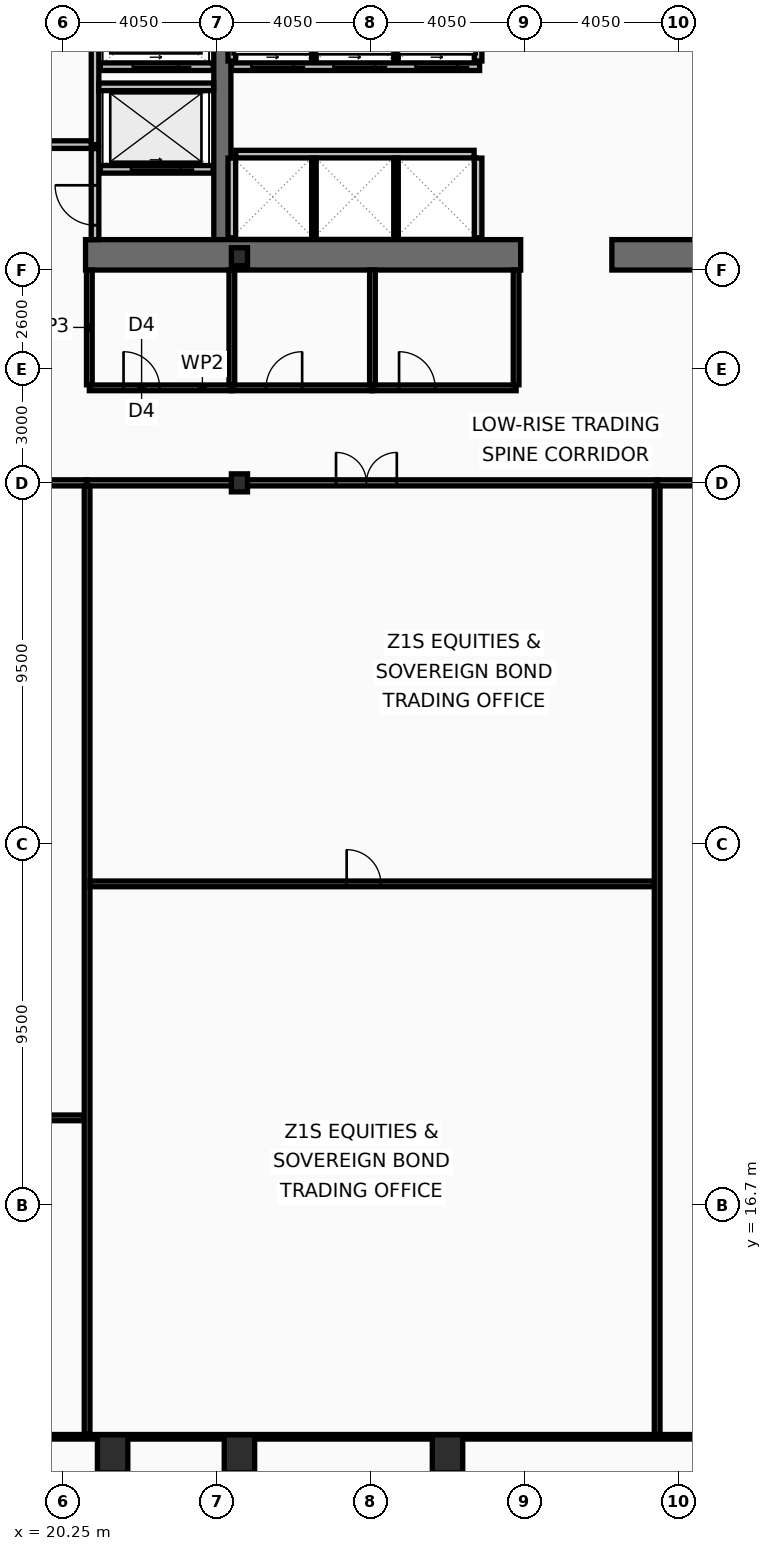
"""IFC4 building model, lengths in metres.
Left out: names, types, materials, properties, quantities, classifications, styles, units other than length and angle.
Written with IfcOpenShell. Run it as: python <this file> out.ifc"""

import sys

from ifc_helpers import new_model, si_unit, direction, frame, frame_2d, origin, origin_2d, place, context, subcontext, project, spatial, rectangle, hollow_rectangle, i_section, extrude, element, fill, save


model = new_model("IFC4")
c1 = context("Model", 3, precision=1e-05, world=origin(), true_north=direction((0.0, 1.0)))
c2 = subcontext(c1, "Body", "Model", "MODEL_VIEW")
j1 = project(units=[si_unit("LENGTHUNIT", "METRE"), si_unit("PLANEANGLEUNIT", "RADIAN")], contexts=[c1])
p1 = place(None, origin())
s1 = spatial("IfcSite", under=j1, at=p1, CompositionType="ELEMENT")
p2 = place(p1, origin())
s2 = spatial("IfcBuilding", under=s1, at=p2, CompositionType="ELEMENT")
p3 = place(p2, frame((0.0, 0.0, 37.8)))
s3 = spatial("IfcBuildingStorey", under=s2, at=p3, CompositionType="ELEMENT", Elevation=37.8)
p4 = place(p3, frame((24.45, 42.1, 0.0), z_axis=(0.0, 0.0, 1.0), x_axis=(0.0, 1.0, 0.0)))
e1 = element("IfcWall", 1, at=p4, inside=s3, PredefinedType="SHEAR", context=c2, shape_type="SweptSolid", body=[
    extrude(rectangle(XDim=10.8, YDim=0.45, at=frame_2d((5.4, 0.0))), origin(), (0.0, 0.0, 1.0), 3.82),
])
p5 = place(p3, frame((32.3, 41.7, 0.0), z_axis=(0.0, 0.0, 1.0), x_axis=(-1.0, 0.0, 0.0)))
e2 = element("IfcWall", 2, at=p5, inside=s3, PredefinedType="SHEAR", context=c2, shape_type="SweptSolid", body=[
    extrude(rectangle(XDim=11.45, YDim=0.8, at=frame_2d((5.725, 0.0))), origin(), (0.0, 0.0, 1.0), 3.82),
])
p6 = place(p3, frame((38.45, 41.7, 0.0), z_axis=(0.0, 0.0, 1.0), x_axis=(-1.0, 0.0, 0.0)))
e3 = element("IfcWall", 3, at=p6, inside=s3, PredefinedType="SHEAR", context=c2, shape_type="SweptSolid", body=[
    extrude(rectangle(XDim=3.75, YDim=0.8, at=frame_2d((1.875, 0.0))), origin(), (0.0, 0.0, 1.0), 3.82),
])
for number, where, z_axis, x_axis in (
    (4, (21.562, 10.15, 0.0), (0.0, 0.0, 1.0), (1.0, 0.0, 0.0)),
    (5, (24.9, 10.15, 0.0), (0.0, 0.0, 1.0), (1.0, 0.0, 0.0)),
    (6, (30.375, 10.15, 0.0), (0.0, 0.0, 1.0), (1.0, 0.0, 0.0)),
):
    element("IfcColumn", number, at=place(p3, frame(where, z_axis=z_axis, x_axis=x_axis)), inside=s3, PredefinedType="COLUMN", context=c2, shape_type="SweptSolid", body=[
        extrude(hollow_rectangle(XDim=0.8, YDim=1.0, WallThickness=0.055, at=origin_2d()), origin(), (0.0, 0.0, 1.0), 4.0),
    ])
for number, where, z_axis, x_axis in (
    (7, (24.9, 35.7, 0.0), (0.0, 0.0, 1.0), (1.0, 0.0, 0.0)),
    (8, (24.9, 41.65, 0.0), (0.0, 0.0, 1.0), (1.0, 0.0, 0.0)),
):
    element("IfcColumn", number, at=place(p3, frame(where, z_axis=z_axis, x_axis=x_axis)), inside=s3, PredefinedType="COLUMN", context=c2, shape_type="SweptSolid", body=[
        extrude(i_section(OverallWidth=0.424, OverallDepth=0.474, WebThickness=0.048, FlangeThickness=0.077, at=origin_2d()), origin(), (0.0, 0.0, 1.0), 4.0),
    ])
p7 = place(p3, frame((24.21, 43.95, 0.0), z_axis=(0.0, 0.0, 1.0), x_axis=(-1.0, 0.0, 0.0)))
e9 = element("IfcWall", 9, at=p7, inside=s3, PredefinedType="PARTITIONING", context=c2, shape_type="SweptSolid", body=[
    extrude(rectangle(XDim=2.97, YDim=0.2, at=frame_2d((1.485, 0.0))), origin(), (0.0, 0.0, 1.0), 3.82),
])
p8 = place(p7, frame((0.86, 0.0, 0.0)))
e10 = element("IfcOpeningElement", 10, at=p8, cuts=e9, PredefinedType="OPENING", context=c2, shape_type="SweptSolid", body=[
    extrude(rectangle(XDim=1.3, YDim=2.18, at=frame_2d((0.65, 1.09))), frame((0.0, 0.11, 0.0), z_axis=(0.0, -1.0, 0.0), x_axis=(1.0, 0.0, 0.0)), (0.0, 0.0, 1.0), 0.22),
])
p9 = place(p3, frame((24.21, 46.65, 0.0), z_axis=(0.0, 0.0, 1.0), x_axis=(-1.0, 0.0, 0.0)))
e11 = element("IfcWall", 11, at=p9, inside=s3, PredefinedType="PARTITIONING", context=c2, shape_type="SweptSolid", body=[
    extrude(rectangle(XDim=2.97, YDim=0.2, at=frame_2d((1.485, 0.0))), origin(), (0.0, 0.0, 1.0), 3.82),
])
p10 = place(p9, frame((0.91, 0.0, 0.0)))
e12 = element("IfcOpeningElement", 12, at=p10, cuts=e11, PredefinedType="OPENING", context=c2, shape_type="SweptSolid", body=[
    extrude(rectangle(XDim=1.2, YDim=2.18, at=frame_2d((0.6, 1.09))), frame((0.0, 0.11, 0.0), z_axis=(0.0, -1.0, 0.0), x_axis=(1.0, 0.0, 0.0)), (0.0, 0.0, 1.0), 0.22),
])
p11 = place(p3, frame((31.22, 46.65, 0.0), z_axis=(0.0, 0.0, 1.0), x_axis=(-1.0, 0.0, 0.0)))
e13 = element("IfcWall", 13, at=p11, inside=s3, PredefinedType="PARTITIONING", context=c2, shape_type="SweptSolid", body=[
    extrude(rectangle(XDim=6.53, YDim=0.2, at=frame_2d((3.265, 0.0))), origin(), (0.0, 0.0, 1.0), 3.82),
])
p12 = place(p11, frame((4.9, 0.0, 0.0)))
e14 = element("IfcOpeningElement", 14, at=p12, cuts=e13, PredefinedType="OPENING", context=c2, shape_type="SweptSolid", body=[
    extrude(rectangle(XDim=1.1, YDim=2.18, at=frame_2d((0.55, 1.09))), frame((0.0, 0.11, 0.0), z_axis=(0.0, -1.0, 0.0), x_axis=(1.0, 0.0, 0.0)), (0.0, 0.0, 1.0), 0.22),
])
p13 = place(p11, frame((2.74, 0.0, 0.0)))
e15 = element("IfcOpeningElement", 15, at=p13, cuts=e13, PredefinedType="OPENING", context=c2, shape_type="SweptSolid", body=[
    extrude(rectangle(XDim=1.1, YDim=2.18, at=frame_2d((0.55, 1.09))), frame((0.0, 0.11, 0.0), z_axis=(0.0, -1.0, 0.0), x_axis=(1.0, 0.0, 0.0)), (0.0, 0.0, 1.0), 0.22),
])
p14 = place(p11, frame((0.58, 0.0, 0.0)))
e16 = element("IfcOpeningElement", 16, at=p14, cuts=e13, PredefinedType="OPENING", context=c2, shape_type="SweptSolid", body=[
    extrude(rectangle(XDim=1.1, YDim=2.18, at=frame_2d((0.55, 1.09))), frame((0.0, 0.11, 0.0), z_axis=(0.0, -1.0, 0.0), x_axis=(1.0, 0.0, 0.0)), (0.0, 0.0, 1.0), 0.22),
])
p15 = place(p3, frame((21.1, 44.6, 0.0), z_axis=(0.0, 0.0, 1.0), x_axis=(0.0, 1.0, 0.0)))
e17 = element("IfcWall", 17, at=p15, inside=s3, PredefinedType="PARTITIONING", context=c2, shape_type="SweptSolid", body=[
    extrude(rectangle(XDim=4.3, YDim=0.2, at=frame_2d((2.15, 0.0))), origin(), (0.0, 0.0, 1.0), 3.82),
])
p16 = place(p3, frame((17.0, 44.6, 0.0), z_axis=(0.0, 0.0, 1.0), x_axis=(1.0, 0.0, 0.0)))
e18 = element("IfcWall", 18, at=p16, inside=s3, PredefinedType="PARTITIONING", context=c2, shape_type="SweptSolid", body=[
    extrude(rectangle(XDim=4.0, YDim=0.2, at=frame_2d((2.0, 0.0))), origin(), (0.0, 0.0, 1.0), 3.82),
])
p17 = place(p16, frame((1.25, 0.0, 0.0)))
e19 = element("IfcOpeningElement", 19, at=p17, cuts=e18, PredefinedType="OPENING", context=c2, shape_type="SweptSolid", body=[
    extrude(rectangle(XDim=1.05, YDim=2.15, at=frame_2d((0.525, 1.075))), frame((0.0, 0.11, 0.0), z_axis=(0.0, -1.0, 0.0), x_axis=(1.0, 0.0, 0.0)), (0.0, 0.0, 1.0), 0.22),
])
p18 = place(p3, frame((21.2, 46.12, 0.0), z_axis=(0.0, 0.0, 1.0), x_axis=(1.0, 0.0, 0.0)))
e20 = element("IfcWall", 20, at=p18, inside=s3, PredefinedType="PARTITIONING", context=c2, shape_type="SweptSolid", body=[
    extrude(rectangle(XDim=3.02, YDim=0.2, at=frame_2d((1.51, 0.0))), origin(), (0.0, 0.0, 1.0), 3.82),
])
p19 = place(p3, frame((21.1, 42.1, 0.0), z_axis=(0.0, 0.0, 1.0), x_axis=(0.0, 1.0, 0.0)))
e21 = element("IfcWall", 21, at=p19, inside=s3, PredefinedType="PARTITIONING", context=c2, shape_type="SweptSolid", body=[
    extrude(rectangle(XDim=2.395, YDim=0.2, at=frame_2d((1.198, 0.0))), origin(), (0.0, 0.0, 1.0), 3.82),
])
p20 = place(p19, frame((0.38, 0.0, 0.0)))
e22 = element("IfcOpeningElement", 22, at=p20, cuts=e21, PredefinedType="OPENING", context=c2, shape_type="SweptSolid", body=[
    extrude(rectangle(XDim=1.05, YDim=2.15, at=frame_2d((0.525, 1.075))), frame((0.0, 0.11, 0.0), z_axis=(0.0, -1.0, 0.0), x_axis=(1.0, 0.0, 0.0)), (0.0, 0.0, 1.0), 0.22),
])
for number, where, z_axis, x_axis in (
    (23, (24.7, 46.8, 0.0), (0.0, 0.0, 1.0), (0.0, 1.0, 0.0)),
    (24, (31.18, 46.8, 0.0), (0.0, 0.0, 1.0), (0.0, 1.0, 0.0)),
):
    element("IfcWall", number, at=place(p3, frame(where, z_axis=z_axis, x_axis=x_axis)), inside=s3, PredefinedType="PARTITIONING", context=c2, shape_type="SweptSolid", body=[
        extrude(rectangle(XDim=2.095, YDim=0.2, at=frame_2d((1.047, 0.0))), origin(), (0.0, 0.0, 1.0), 3.82),
    ])
for number, where, z_axis, x_axis in (
    (25, (26.86, 46.8, 0.0), (0.0, 0.0, 1.0), (0.0, 1.0, 0.0)),
    (26, (29.02, 46.8, 0.0), (0.0, 0.0, 1.0), (0.0, 1.0, 0.0)),
):
    element("IfcWall", number, at=place(p3, frame(where, z_axis=z_axis, x_axis=x_axis)), inside=s3, PredefinedType="PARTITIONING", context=c2, shape_type="SweptSolid", body=[
        extrude(rectangle(XDim=2.095, YDim=0.12, at=frame_2d((1.047, 0.0))), origin(), (0.0, 0.0, 1.0), 3.82),
    ])
p21 = place(p3, frame((24.805, 44.35, 0.0), z_axis=(0.0, 0.0, 1.0), x_axis=(1.0, 0.0, 0.0)))
e27 = element("IfcWall", 27, at=p21, inside=s3, PredefinedType="PARTITIONING", context=c2, shape_type="SweptSolid", body=[
    extrude(rectangle(XDim=6.27, YDim=0.2, at=frame_2d((3.135, 0.0))), origin(), (0.0, 0.0, 1.0), 3.82),
])
for number, where, z_axis, x_axis in (
    (28, (24.7, 42.15, 0.0), (0.0, 0.0, 1.0), (0.0, 1.0, 0.0)),
    (29, (31.18, 42.15, 0.0), (0.0, 0.0, 1.0), (0.0, 1.0, 0.0)),
):
    element("IfcWall", number, at=place(p3, frame(where, z_axis=z_axis, x_axis=x_axis)), inside=s3, PredefinedType="PARTITIONING", context=c2, shape_type="SweptSolid", body=[
        extrude(rectangle(XDim=2.095, YDim=0.2, at=frame_2d((1.048, 0.0))), origin(), (0.0, 0.0, 1.0), 3.82),
    ])
for number, where, z_axis, x_axis in (
    (30, (26.86, 42.15, 0.0), (0.0, 0.0, 1.0), (0.0, 1.0, 0.0)),
    (31, (29.02, 42.15, 0.0), (0.0, 0.0, 1.0), (0.0, 1.0, 0.0)),
):
    element("IfcWall", number, at=place(p3, frame(where, z_axis=z_axis, x_axis=x_axis)), inside=s3, PredefinedType="PARTITIONING", context=c2, shape_type="SweptSolid", body=[
        extrude(rectangle(XDim=2.095, YDim=0.12, at=frame_2d((1.048, 0.0))), origin(), (0.0, 0.0, 1.0), 3.82),
    ])
p22 = place(p3, frame((20.95, 38.2, 0.0), z_axis=(0.0, 0.0, 1.0), x_axis=(1.0, 0.0, 0.0)))
e32 = element("IfcWall", 32, at=p22, inside=s3, PredefinedType="PARTITIONING", context=c2, shape_type="SweptSolid", body=[
    extrude(rectangle(XDim=3.75, YDim=0.15, at=frame_2d((1.875, 0.0))), origin(), (0.0, 0.0, 1.0), 3.01),
])
p23 = place(p22, frame((0.9, 0.0, 0.0)))
e33 = element("IfcOpeningElement", 33, at=p23, cuts=e32, PredefinedType="OPENING", context=c2, shape_type="SweptSolid", body=[
    extrude(rectangle(XDim=0.95, YDim=2.05, at=frame_2d((0.475, 1.025))), frame((0.0, 0.085, 0.0), z_axis=(0.0, -1.0, 0.0), x_axis=(1.0, 0.0, 0.0)), (0.0, 0.0, 1.0), 0.17),
])
p24 = place(p3, frame((24.7, 38.2, 0.0), z_axis=(0.0, 0.0, 1.0), x_axis=(1.0, 0.0, 0.0)))
e34 = element("IfcWall", 34, at=p24, inside=s3, PredefinedType="PARTITIONING", context=c2, shape_type="SweptSolid", body=[
    extrude(rectangle(XDim=3.7, YDim=0.15, at=frame_2d((1.85, 0.0))), origin(), (0.0, 0.0, 1.0), 3.01),
])
p25 = place(p24, frame((0.9, 0.0, 0.0)))
e35 = element("IfcOpeningElement", 35, at=p25, cuts=e34, PredefinedType="OPENING", context=c2, shape_type="SweptSolid", body=[
    extrude(rectangle(XDim=0.95, YDim=2.05, at=frame_2d((0.475, 1.025))), frame((0.0, 0.085, 0.0), z_axis=(0.0, -1.0, 0.0), x_axis=(1.0, 0.0, 0.0)), (0.0, 0.0, 1.0), 0.17),
])
p26 = place(p3, frame((28.4, 38.2, 0.0), z_axis=(0.0, 0.0, 1.0), x_axis=(1.0, 0.0, 0.0)))
e36 = element("IfcWall", 36, at=p26, inside=s3, PredefinedType="PARTITIONING", context=c2, shape_type="SweptSolid", body=[
    extrude(rectangle(XDim=3.78, YDim=0.15, at=frame_2d((1.89, 0.0))), origin(), (0.0, 0.0, 1.0), 3.01),
])
p27 = place(p26, frame((0.7, 0.0, 0.0)))
e37 = element("IfcOpeningElement", 37, at=p27, cuts=e36, PredefinedType="OPENING", context=c2, shape_type="SweptSolid", body=[
    extrude(rectangle(XDim=0.95, YDim=2.05, at=frame_2d((0.475, 1.025))), frame((0.0, 0.085, 0.0), z_axis=(0.0, -1.0, 0.0), x_axis=(1.0, 0.0, 0.0)), (0.0, 0.0, 1.0), 0.17),
])
p28 = place(p3, frame((20.95, 38.28, 0.0), z_axis=(0.0, 0.0, 1.0), x_axis=(0.0, 1.0, 0.0)))
e38 = element("IfcWall", 38, at=p28, inside=s3, PredefinedType="PARTITIONING", context=c2, shape_type="SweptSolid", body=[
    extrude(rectangle(XDim=3.02, YDim=0.15, at=frame_2d((1.51, 0.0))), origin(), (0.0, 0.0, 1.0), 3.82),
])
p29 = place(p3, frame((24.7, 38.28, 0.0), z_axis=(0.0, 0.0, 1.0), x_axis=(0.0, 1.0, 0.0)))
e39 = element("IfcWall", 39, at=p29, inside=s3, PredefinedType="PARTITIONING", context=c2, shape_type="SweptSolid", body=[
    extrude(rectangle(XDim=3.02, YDim=0.15, at=frame_2d((1.51, 0.0))), origin(), (0.0, 0.0, 1.0), 3.01),
])
for number, where, z_axis, x_axis in (
    (40, (28.4, 38.28, 0.0), (0.0, 0.0, 1.0), (0.0, 1.0, 0.0)),
    (41, (32.18, 38.28, 0.0), (0.0, 0.0, 1.0), (0.0, 1.0, 0.0)),
):
    element("IfcWall", number, at=place(p3, frame(where, z_axis=z_axis, x_axis=x_axis)), inside=s3, PredefinedType="PARTITIONING", context=c2, shape_type="SweptSolid", body=[
        extrude(rectangle(XDim=3.02, YDim=0.15, at=frame_2d((1.51, 0.0))), origin(), (0.0, 0.0, 1.0), 3.82),
    ])
p30 = place(p3, frame((2.03, 35.7, 0.0), z_axis=(0.0, 0.0, 1.0), x_axis=(1.0, 0.0, 0.0)))
e42 = element("IfcWall", 42, at=p30, inside=s3, PredefinedType="PARTITIONING", context=c2, shape_type="SweptSolid", body=[
    extrude(rectangle(XDim=18.861, YDim=0.16, at=frame_2d((9.431, 0.0))), origin(), (0.0, 0.0, 1.0), 3.01),
])
p31 = place(p30, frame((8.172, 0.0, 0.0)))
e43 = element("IfcOpeningElement", 43, at=p31, cuts=e42, PredefinedType="OPENING", context=c2, shape_type="SweptSolid", body=[
    extrude(rectangle(XDim=1.6, YDim=2.15, at=frame_2d((0.8, 1.075))), frame((0.0, 0.09, 0.0), z_axis=(0.0, -1.0, 0.0), x_axis=(1.0, 0.0, 0.0)), (0.0, 0.0, 1.0), 0.18),
])
p32 = place(p3, frame((2.095, 18.991, 0.0), z_axis=(0.0, 0.0, 1.0), x_axis=(1.0, 0.0, 0.0)))
e44 = element("IfcWall", 44, at=p32, inside=s3, PredefinedType="PARTITIONING", context=c2, shape_type="SweptSolid", body=[
    extrude(rectangle(XDim=18.716, YDim=0.15, at=frame_2d((9.358, 0.0))), origin(), (0.0, 0.0, 1.0), 3.01),
])
p33 = place(p32, frame((8.487, 0.0, 0.0)))
e45 = element("IfcOpeningElement", 45, at=p33, cuts=e44, PredefinedType="OPENING", context=c2, shape_type="SweptSolid", body=[
    extrude(rectangle(XDim=0.9, YDim=2.05, at=frame_2d((0.45, 1.025))), frame((0.0, 0.085, 0.0), z_axis=(0.0, -1.0, 0.0), x_axis=(1.0, 0.0, 0.0)), (0.0, 0.0, 1.0), 0.17),
])
p34 = place(p3, frame((20.891, 35.7, 0.0), z_axis=(0.0, 0.0, 1.0), x_axis=(1.0, 0.0, 0.0)))
e46 = element("IfcWall", 46, at=p34, inside=s3, PredefinedType="PARTITIONING", context=c2, shape_type="SweptSolid", body=[
    extrude(rectangle(XDim=15.0, YDim=0.16, at=frame_2d((7.5, 0.0))), origin(), (0.0, 0.0, 1.0), 3.01),
])
p35 = place(p34, frame((6.55, 0.0, 0.0)))
e47 = element("IfcOpeningElement", 47, at=p35, cuts=e46, PredefinedType="OPENING", context=c2, shape_type="SweptSolid", body=[
    extrude(rectangle(XDim=1.6, YDim=2.15, at=frame_2d((0.8, 1.075))), frame((0.0, 0.09, 0.0), z_axis=(0.0, -1.0, 0.0), x_axis=(1.0, 0.0, 0.0)), (0.0, 0.0, 1.0), 0.18),
])
p36 = place(p3, frame((20.891, 10.665, 0.0), z_axis=(0.0, 0.0, 1.0), x_axis=(0.0, 1.0, 0.0)))
e48 = element("IfcWall", 48, at=p36, inside=s3, PredefinedType="PARTITIONING", context=c2, shape_type="SweptSolid", body=[
    extrude(rectangle(XDim=24.95, YDim=0.15, at=frame_2d((12.475, 0.0))), origin(), (0.0, 0.0, 1.0), 3.21),
])
p37 = place(p3, frame((20.971, 25.148, 0.0), z_axis=(0.0, 0.0, 1.0), x_axis=(1.0, 0.0, 0.0)))
e49 = element("IfcWall", 49, at=p37, inside=s3, PredefinedType="PARTITIONING", context=c2, shape_type="SweptSolid", body=[
    extrude(rectangle(XDim=14.841, YDim=0.15, at=frame_2d((7.42, 0.0))), origin(), (0.0, 0.0, 1.0), 3.01),
])
p38 = place(p37, frame((6.75, 0.0, 0.0)))
e50 = element("IfcOpeningElement", 50, at=p38, cuts=e49, PredefinedType="OPENING", context=c2, shape_type="SweptSolid", body=[
    extrude(rectangle(XDim=0.9, YDim=2.05, at=frame_2d((0.45, 1.025))), frame((0.0, 0.085, 0.0), z_axis=(0.0, -1.0, 0.0), x_axis=(1.0, 0.0, 0.0)), (0.0, 0.0, 1.0), 0.17),
])
p39 = place(p3, frame((35.892, 35.7, 0.0), z_axis=(0.0, 0.0, 1.0), x_axis=(1.0, 0.0, 0.0)))
e51 = element("IfcWall", 51, at=p39, inside=s3, PredefinedType="PARTITIONING", context=c2, shape_type="SweptSolid", body=[
    extrude(rectangle(XDim=9.43, YDim=0.16, at=frame_2d((4.715, 0.0))), origin(), (0.0, 0.0, 1.0), 3.01),
])
p40 = place(p39, frame((4.211, 0.0, 0.0)))
e52 = element("IfcOpeningElement", 52, at=p40, cuts=e51, PredefinedType="OPENING", context=c2, shape_type="SweptSolid", body=[
    extrude(rectangle(XDim=1.0, YDim=2.05, at=frame_2d((0.5, 1.025))), frame((0.0, 0.09, 0.0), z_axis=(0.0, -1.0, 0.0), x_axis=(1.0, 0.0, 0.0)), (0.0, 0.0, 1.0), 0.18),
])
p41 = place(p3, frame((35.892, 10.665, 0.0), z_axis=(0.0, 0.0, 1.0), x_axis=(0.0, 1.0, 0.0)))
e53 = element("IfcWall", 53, at=p41, inside=s3, PredefinedType="PARTITIONING", context=c2, shape_type="SweptSolid", body=[
    extrude(rectangle(XDim=24.95, YDim=0.15, at=frame_2d((12.475, 0.0))), origin(), (0.0, 0.0, 1.0), 3.21),
])
p42 = place(p3, frame((2.095, 10.6, 0.0), z_axis=(0.0, 0.0, 1.0), x_axis=(1.0, 0.0, 0.0)))
e54 = element("IfcWall", 54, at=p42, inside=s3, PredefinedType="PARTITIONING", context=c2, shape_type="SweptSolid", body=[
    extrude(rectangle(XDim=68.71, YDim=0.12, at=frame_2d((34.355, 0.0))), origin(), (0.0, 0.0, 1.0), 3.01),
])
p43 = place(p8, origin())
e55 = element("IfcDoor", 55, at=p43, inside=s3, OperationType="SLIDING_TO_LEFT", PredefinedType="DOOR", context=c2, shape_type="SweptSolid", body=[
    extrude(rectangle(XDim=1.3, YDim=2.18, at=frame_2d((0.65, 1.09))), frame((0.0, 0.025, 0.0), z_axis=(0.0, -1.0, 0.0), x_axis=(1.0, 0.0, 0.0)), (0.0, 0.0, 1.0), 0.05),
])
fill(e10, e55)
p44 = place(p10, origin())
e56 = element("IfcDoor", 56, at=p44, inside=s3, OperationType="SLIDING_TO_LEFT", PredefinedType="DOOR", context=c2, shape_type="SweptSolid", body=[
    extrude(rectangle(XDim=1.2, YDim=2.18, at=frame_2d((0.6, 1.09))), frame((0.0, 0.025, 0.0), z_axis=(0.0, -1.0, 0.0), x_axis=(1.0, 0.0, 0.0)), (0.0, 0.0, 1.0), 0.05),
])
fill(e12, e56)
p45 = place(p12, origin())
e57 = element("IfcDoor", 57, at=p45, inside=s3, OperationType="SLIDING_TO_LEFT", PredefinedType="DOOR", context=c2, shape_type="SweptSolid", body=[
    extrude(rectangle(XDim=1.1, YDim=2.18, at=frame_2d((0.55, 1.09))), frame((0.0, 0.025, 0.0), z_axis=(0.0, -1.0, 0.0), x_axis=(1.0, 0.0, 0.0)), (0.0, 0.0, 1.0), 0.05),
])
fill(e14, e57)
p46 = place(p13, origin())
e58 = element("IfcDoor", 58, at=p46, inside=s3, OperationType="SLIDING_TO_LEFT", PredefinedType="DOOR", context=c2, shape_type="SweptSolid", body=[
    extrude(rectangle(XDim=1.1, YDim=2.18, at=frame_2d((0.55, 1.09))), frame((0.0, 0.025, 0.0), z_axis=(0.0, -1.0, 0.0), x_axis=(1.0, 0.0, 0.0)), (0.0, 0.0, 1.0), 0.05),
])
fill(e15, e58)
p47 = place(p14, origin())
e59 = element("IfcDoor", 59, at=p47, inside=s3, OperationType="SLIDING_TO_LEFT", PredefinedType="DOOR", context=c2, shape_type="SweptSolid", body=[
    extrude(rectangle(XDim=1.1, YDim=2.18, at=frame_2d((0.55, 1.09))), frame((0.0, 0.025, 0.0), z_axis=(0.0, -1.0, 0.0), x_axis=(1.0, 0.0, 0.0)), (0.0, 0.0, 1.0), 0.05),
])
fill(e16, e59)
p48 = place(p20, origin())
e60 = element("IfcDoor", 60, at=p48, inside=s3, OperationType="SINGLE_SWING_RIGHT", PredefinedType="DOOR", context=c2, shape_type="SweptSolid", body=[
    extrude(rectangle(XDim=1.05, YDim=2.15, at=frame_2d((0.525, 1.075))), frame((0.0, 0.025, 0.0), z_axis=(0.0, -1.0, 0.0), x_axis=(1.0, 0.0, 0.0)), (0.0, 0.0, 1.0), 0.05),
])
fill(e22, e60)
p49 = place(p23, origin())
e61 = element("IfcDoor", 61, at=p49, inside=s3, OperationType="SINGLE_SWING_LEFT", PredefinedType="DOOR", context=c2, shape_type="SweptSolid", body=[
    extrude(rectangle(XDim=0.95, YDim=2.05, at=frame_2d((0.475, 1.025))), frame((0.0, 0.025, 0.0), z_axis=(0.0, -1.0, 0.0), x_axis=(1.0, 0.0, 0.0)), (0.0, 0.0, 1.0), 0.05),
])
fill(e33, e61)
p50 = place(p25, origin())
e62 = element("IfcDoor", 62, at=p50, inside=s3, OperationType="SINGLE_SWING_RIGHT", PredefinedType="DOOR", context=c2, shape_type="SweptSolid", body=[
    extrude(rectangle(XDim=0.95, YDim=2.05, at=frame_2d((0.475, 1.025))), frame((0.0, 0.025, 0.0), z_axis=(0.0, -1.0, 0.0), x_axis=(1.0, 0.0, 0.0)), (0.0, 0.0, 1.0), 0.05),
])
fill(e35, e62)
p51 = place(p27, origin())
e63 = element("IfcDoor", 63, at=p51, inside=s3, OperationType="SINGLE_SWING_LEFT", PredefinedType="DOOR", context=c2, shape_type="SweptSolid", body=[
    extrude(rectangle(XDim=0.95, YDim=2.05, at=frame_2d((0.475, 1.025))), frame((0.0, 0.025, 0.0), z_axis=(0.0, -1.0, 0.0), x_axis=(1.0, 0.0, 0.0)), (0.0, 0.0, 1.0), 0.05),
])
fill(e37, e63)
p52 = place(p35, origin())
e64 = element("IfcDoor", 64, at=p52, inside=s3, OperationType="DOUBLE_DOOR_SINGLE_SWING", PredefinedType="DOOR", context=c2, shape_type="SweptSolid", body=[
    extrude(rectangle(XDim=1.6, YDim=2.15, at=frame_2d((0.8, 1.075))), frame((0.0, 0.025, 0.0), z_axis=(0.0, -1.0, 0.0), x_axis=(1.0, 0.0, 0.0)), (0.0, 0.0, 1.0), 0.05),
])
fill(e47, e64)
p53 = place(p38, origin())
e65 = element("IfcDoor", 65, at=p53, inside=s3, OperationType="SINGLE_SWING_LEFT", PredefinedType="DOOR", context=c2, shape_type="SweptSolid", body=[
    extrude(rectangle(XDim=0.9, YDim=2.05, at=frame_2d((0.45, 1.025))), frame((0.0, 0.025, 0.0), z_axis=(0.0, -1.0, 0.0), x_axis=(1.0, 0.0, 0.0)), (0.0, 0.0, 1.0), 0.05),
])
fill(e50, e65)
save(model, sys.argv[1])
